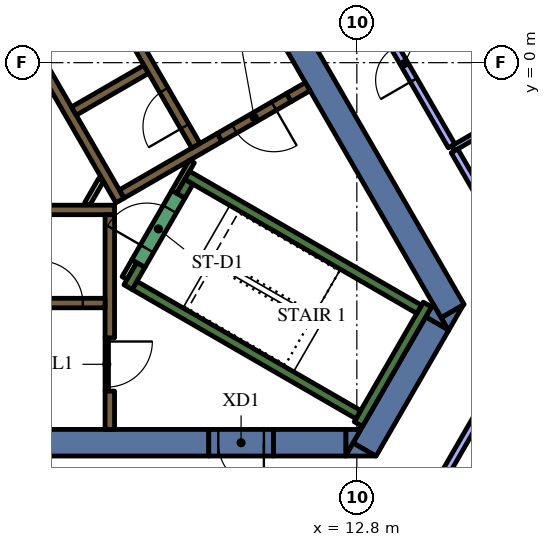
"""IFC4 building model, lengths in metres.
Left out: names, types, materials, properties, quantities, classifications, styles, units other than length and angle.
Written with IfcOpenShell. Run it as: python <this file> out.ifc"""

import sys

from ifc_helpers import new_model, si_unit, direction, frame, frame_2d, origin, place, context, subcontext, project, spatial, polyline, rectangle, outline, extrude, element, fill, save


model = new_model("IFC4")
c1 = context("Model", 3, precision=1e-05, world=origin(), true_north=direction((0.0, 1.0)))
c2 = subcontext(c1, "Body", "Model", "MODEL_VIEW")
j1 = project(units=[si_unit("LENGTHUNIT", "METRE"), si_unit("PLANEANGLEUNIT", "RADIAN")], contexts=[c1])
p1 = place(None, origin())
s1 = spatial("IfcSite", under=j1, at=p1, CompositionType="ELEMENT")
p2 = place(p1, origin())
s2 = spatial("IfcBuilding", under=s1, at=p2, CompositionType="ELEMENT")
p3 = place(p2, frame((0.0, 0.0, 231.0)))
s3 = spatial("IfcBuildingStorey", under=s2, at=p3, CompositionType="ELEMENT", Elevation=231.0)
p4 = place(p3, frame((9.085, 4.264, 0.0), z_axis=(0.0, 0.0, 1.0), x_axis=(0.499998082512, -0.866026510844, 0.0)))
e1 = element("IfcWall", 1, at=p4, inside=s3, PredefinedType="SOLIDWALL", context=c2, shape_type="SweptSolid", body=[
    extrude(rectangle(XDim=12.472, YDim=0.7, at=frame_2d((6.236, 0.0))), origin(), (0.0, 0.0, 1.0), 4.2),
])
p5 = place(p3, origin())
e2 = element("IfcWall", 2, at=p5, inside=s3, PredefinedType="SOLIDWALL", context=c2, shape_type="SweptSolid", body=[
    extrude(outline(polyline([(15.213, -7.05), (15.019, -6.714), (15.601, -6.378), (15.213, -7.05)])), origin(), (0.0, 0.0, 1.0), 4.2),
])
p6 = place(p3, frame((13.003, -10.179, 0.0), z_axis=(0.0, 0.0, 1.0), x_axis=(0.499972675833, 0.866041178825, 0.0)))
e3 = element("IfcWall", 3, at=p6, inside=s3, PredefinedType="SOLIDWALL", context=c2, shape_type="SweptSolid", body=[
    extrude(rectangle(XDim=3.829, YDim=0.7, at=frame_2d((1.915, 0.0))), origin(), (0.0, 0.0, 1.0), 4.2),
])
e4 = element("IfcWall", 4, at=p5, inside=s3, PredefinedType="SOLIDWALL", context=c2, shape_type="SweptSolid", body=[
    extrude(outline(polyline([(12.5, -10.35), (12.698, -10.005), (13.296, -10.35), (12.5, -10.35)])), origin(), (0.0, 0.0, 1.0), 4.2),
])
e5 = element("IfcWall", 5, at=p5, inside=s3, PredefinedType="SOLIDWALL", context=c2, shape_type="SweptSolid", body=[
    extrude(outline(polyline([(14.809, -6.35), (15.197, -7.022), (14.615, -6.686), (14.809, -6.35)])), origin(), (0.0, 0.0, 1.0), 4.2),
])
p7 = place(p3, frame((10.604, -10.0, 0.0), z_axis=(0.0, 0.0, 1.0), x_axis=(1.0, 0.0, 0.0)))
e6 = element("IfcWall", 6, at=p7, inside=s3, PredefinedType="SOLIDWALL", context=c2, shape_type="SweptSolid", body=[
    extrude(rectangle(XDim=1.909, YDim=0.7, at=frame_2d((0.955, 0.0))), origin(), (0.0, 0.0, 1.0), 4.2),
])
e7 = element("IfcWall", 7, at=p5, inside=s3, PredefinedType="SOLIDWALL", context=c2, shape_type="SweptSolid", body=[
    extrude(outline(polyline([(12.904, -9.65), (12.516, -10.322), (12.516, -9.65), (12.904, -9.65)])), origin(), (0.0, 0.0, 1.0), 4.2),
])
p8 = place(p3, frame((8.904, -10.0, 0.0), z_axis=(0.0, 0.0, 1.0), x_axis=(-1.0, 0.0, 0.0)))
e8 = element("IfcWall", 8, at=p8, inside=s3, PredefinedType="SOLIDWALL", context=c2, shape_type="SweptSolid", body=[
    extrude(rectangle(XDim=22.226, YDim=0.7, at=frame_2d((11.113, 0.0))), origin(), (0.0, 0.0, 1.0), 4.2),
])
p9 = place(p3, frame((12.84, -9.511, 0.0), z_axis=(0.0, 0.0, 1.0), x_axis=(0.500048121057, 0.865997619297, 0.0)))
e9 = element("IfcWall", 9, at=p9, inside=s3, PredefinedType="SOLIDWALL", context=c2, shape_type="SweptSolid", body=[
    extrude(rectangle(XDim=3.634, YDim=0.25, at=frame_2d((1.817, 0.0))), origin(), (0.0, 0.0, 1.0), 4.2),
])
p10 = place(p3, frame((12.84, -9.261, 0.0), z_axis=(0.0, 0.0, 1.0), x_axis=(-0.866013990052, 0.500019768644, 0.0)))
e10 = element("IfcWall", 10, at=p10, inside=s3, PredefinedType="SOLIDWALL", context=c2, shape_type="SweptSolid", body=[
    extrude(rectangle(XDim=6.8, YDim=0.25, at=frame_2d((3.4, 0.0))), origin(), (0.0, 0.0, 1.0), 4.2),
])
p11 = place(p3, frame((6.78, -5.906, 0.0), z_axis=(0.0, 0.0, 1.0), x_axis=(0.500223362819, 0.865896406789, 0.0)))
e11 = element("IfcWall", 11, at=p11, inside=s3, PredefinedType="SOLIDWALL", context=c2, shape_type="SweptSolid", body=[
    extrude(rectangle(XDim=0.675, YDim=0.25, at=frame_2d((0.337, 0.0))), origin(), (0.0, 0.0, 1.0), 4.2),
])
p12 = place(p3, frame((8.334, -2.964, 0.0), z_axis=(0.0, 0.0, 1.0), x_axis=(0.866016039709, -0.500016218704, 0.0)))
e12 = element("IfcWall", 12, at=p12, inside=s3, PredefinedType="SOLIDWALL", context=c2, shape_type="SweptSolid", body=[
    extrude(rectangle(XDim=7.05, YDim=0.25, at=frame_2d((3.525, 0.0))), origin(), (0.0, 0.0, 1.0), 4.2),
])
p13 = place(p3, frame((8.168, -3.503, 0.0), z_axis=(0.0, 0.0, 1.0), x_axis=(0.49972245349, 0.866185586049, 0.0)))
e13 = element("IfcWall", 13, at=p13, inside=s3, PredefinedType="SOLIDWALL", context=c2, shape_type="SweptSolid", body=[
    extrude(rectangle(XDim=0.425, YDim=0.25, at=frame_2d((0.212, 0.0))), origin(), (0.0, 0.0, 1.0), 4.2),
])
p14 = place(p3, frame((-5.545, -3.875, 0.0), z_axis=(0.0, 0.0, 1.0), x_axis=(1.0, 0.0, 0.0)))
e14 = element("IfcWall", 14, at=p14, inside=s3, PredefinedType="SOLIDWALL", context=c2, shape_type="SweptSolid", body=[
    extrude(rectangle(XDim=11.97, YDim=0.25, at=frame_2d((5.985, 0.0))), origin(), (0.0, 0.0, 1.0), 4.2),
])
p15 = place(p3, frame((6.3, -7.24, 0.0), z_axis=(0.0, 0.0, 1.0), x_axis=(0.0, 1.0, 0.0)))
e15 = element("IfcWall", 15, at=p15, inside=s3, PredefinedType="SOLIDWALL", context=c2, shape_type="SweptSolid", body=[
    extrude(rectangle(XDim=3.24, YDim=0.25, at=frame_2d((1.62, 0.0))), origin(), (0.0, 0.0, 1.0), 4.2),
])
p16 = place(p3, frame((6.3, -9.65, 0.0), z_axis=(0.0, 0.0, 1.0), x_axis=(0.0, 1.0, 0.0)))
e16 = element("IfcWall", 16, at=p16, inside=s3, PredefinedType="SOLIDWALL", context=c2, shape_type="SweptSolid", body=[
    extrude(rectangle(XDim=1.008, YDim=0.25, at=frame_2d((0.504, 0.0))), origin(), (0.0, 0.0, 1.0), 4.2),
])
p17 = place(p3, frame((11.507, -0.631, 0.0), z_axis=(0.0, 0.0, 1.0), x_axis=(-0.866093731455, -0.499881634324, 0.0)))
e17 = element("IfcWall", 17, at=p17, inside=s3, PredefinedType="SOLIDWALL", context=c2, shape_type="SweptSolid", body=[
    extrude(rectangle(XDim=0.575, YDim=0.25, at=frame_2d((0.288, 0.0))), origin(), (0.0, 0.0, 1.0), 4.2),
])
p18 = place(p3, frame((6.568, -3.627, 0.0), z_axis=(0.0, 0.0, 1.0), x_axis=(-0.499999455981, 0.866025717874, 0.0)))
e18 = element("IfcWall", 18, at=p18, inside=s3, PredefinedType="SOLIDWALL", context=c2, shape_type="SweptSolid", body=[
    extrude(rectangle(XDim=11.978, YDim=0.25, at=frame_2d((5.989, 0.0))), origin(), (0.0, 0.0, 1.0), 4.2),
])
p19 = place(p3, frame((5.354, -1.274, 0.0), z_axis=(0.0, 0.0, 1.0), x_axis=(0.866008176907, 0.50002983664, 0.0)))
e19 = element("IfcWall", 19, at=p19, inside=s3, PredefinedType="SOLIDWALL", context=c2, shape_type="SweptSolid", body=[
    extrude(rectangle(XDim=2.2, YDim=0.25, at=frame_2d((1.1, 0.0))), origin(), (0.0, 0.0, 1.0), 4.2),
])
p20 = place(p3, frame((6.614, -3.456, 0.0), z_axis=(0.0, 0.0, 1.0), x_axis=(0.866032512851, 0.499987686533, 0.0)))
e20 = element("IfcWall", 20, at=p20, inside=s3, PredefinedType="SOLIDWALL", context=c2, shape_type="SweptSolid", body=[
    extrude(rectangle(XDim=2.975, YDim=0.25, at=frame_2d((1.487, 0.0))), origin(), (0.0, 0.0, 1.0), 4.2),
])
p21 = place(p3, frame((6.945, -5.222, 0.0), z_axis=(0.0, 0.0, 1.0), x_axis=(-0.499818422106, -0.866130212453, 0.0)))
e21 = element("IfcWall", 21, at=p21, inside=s3, PredefinedType="PARTITIONING", context=c2, shape_type="SweptSolid", body=[
    extrude(rectangle(XDim=0.514, YDim=0.15, at=frame_2d((0.257, 0.0))), origin(), (0.0, 0.0, 1.0), 3.45),
])
p22 = place(p3, frame((8.459, -2.599, 0.0), z_axis=(0.0, 0.0, 1.0), x_axis=(-0.500041054325, -0.866001699761, 0.0)))
e22 = element("IfcWall", 22, at=p22, inside=s3, PredefinedType="PARTITIONING", context=c2, shape_type="SweptSolid", body=[
    extrude(rectangle(XDim=0.929, YDim=0.15, at=frame_2d((0.464, 0.0))), origin(), (0.0, 0.0, 1.0), 4.2),
])
p23 = place(p3, frame((5.705, -3.718, 0.0), z_axis=(0.0, 0.0, 1.0), x_axis=(0.499962090823, 0.866047289552, 0.0)))
e23 = element("IfcWall", 23, at=p23, inside=s3, PredefinedType="PARTITIONING", context=c2, shape_type="SweptSolid", body=[
    extrude(rectangle(XDim=0.735, YDim=0.15, at=frame_2d((0.367, 0.0))), origin(), (0.0, 0.0, 1.0), 3.45),
])
p24 = place(p3, frame((-6.175, -6.325, 0.0), z_axis=(0.0, 0.0, 1.0), x_axis=(1.0, 0.0, 0.0)))
e24 = element("IfcWall", 24, at=p24, inside=s3, PredefinedType="SOLIDWALL", context=c2, shape_type="SweptSolid", body=[
    extrude(rectangle(XDim=12.35, YDim=0.25, at=frame_2d((6.175, 0.0))), origin(), (0.0, 0.0, 1.0), 4.2),
])
p25 = place(p24, frame((0.585, 0.0, 0.0)))
e25 = element("IfcOpeningElement", 25, at=p25, cuts=e24, PredefinedType="OPENING", context=c2, shape_type="SweptSolid", body=[
    extrude(rectangle(XDim=1.1, YDim=2.1, at=frame_2d((0.55, 1.05))), frame((0.0, 0.135, 0.0), z_axis=(0.0, -1.0, 0.0), x_axis=(1.0, 0.0, 0.0)), (0.0, 0.0, 1.0), 0.27),
])
p26 = place(p24, frame((3.105, 0.0, 0.0)))
e26 = element("IfcOpeningElement", 26, at=p26, cuts=e24, PredefinedType="OPENING", context=c2, shape_type="SweptSolid", body=[
    extrude(rectangle(XDim=1.1, YDim=2.1, at=frame_2d((0.55, 1.05))), frame((0.0, 0.135, 0.0), z_axis=(0.0, -1.0, 0.0), x_axis=(1.0, 0.0, 0.0)), (0.0, 0.0, 1.0), 0.27),
])
p27 = place(p24, frame((5.625, 0.0, 0.0)))
e27 = element("IfcOpeningElement", 27, at=p27, cuts=e24, PredefinedType="OPENING", context=c2, shape_type="SweptSolid", body=[
    extrude(rectangle(XDim=1.1, YDim=2.1, at=frame_2d((0.55, 1.05))), frame((0.0, 0.135, 0.0), z_axis=(0.0, -1.0, 0.0), x_axis=(1.0, 0.0, 0.0)), (0.0, 0.0, 1.0), 0.27),
])
p28 = place(p24, frame((8.145, 0.0, 0.0)))
e28 = element("IfcOpeningElement", 28, at=p28, cuts=e24, PredefinedType="OPENING", context=c2, shape_type="SweptSolid", body=[
    extrude(rectangle(XDim=1.1, YDim=2.1, at=frame_2d((0.55, 1.05))), frame((0.0, 0.135, 0.0), z_axis=(0.0, -1.0, 0.0), x_axis=(1.0, 0.0, 0.0)), (0.0, 0.0, 1.0), 0.27),
])
p29 = place(p24, frame((10.665, 0.0, 0.0)))
e29 = element("IfcOpeningElement", 29, at=p29, cuts=e24, PredefinedType="OPENING", context=c2, shape_type="SweptSolid", body=[
    extrude(rectangle(XDim=1.1, YDim=2.1, at=frame_2d((0.55, 1.05))), frame((0.0, 0.135, 0.0), z_axis=(0.0, -1.0, 0.0), x_axis=(1.0, 0.0, 0.0)), (0.0, 0.0, 1.0), 0.27),
])
p30 = place(p3, frame((8.565, -2.185, 0.0), z_axis=(0.0, 0.0, 1.0), x_axis=(-0.499997954832, 0.866026584559, 0.0)))
e30 = element("IfcWall", 30, at=p30, inside=s3, PredefinedType="SOLIDWALL", context=c2, shape_type="SweptSolid", body=[
    extrude(rectangle(XDim=12.35, YDim=0.25, at=frame_2d((6.175, 0.0))), origin(), (0.0, 0.0, 1.0), 4.2),
])
p31 = place(p30, frame((0.585, 0.0, 0.0)))
e31 = element("IfcOpeningElement", 31, at=p31, cuts=e30, PredefinedType="OPENING", context=c2, shape_type="SweptSolid", body=[
    extrude(rectangle(XDim=1.1, YDim=2.1, at=frame_2d((0.55, 1.05))), frame((0.0, 0.135, 0.0), z_axis=(0.0, -1.0, 0.0), x_axis=(1.0, 0.0, 0.0)), (0.0, 0.0, 1.0), 0.27),
])
p32 = place(p3, frame((7.053, -5.284, 0.0), z_axis=(0.0, 0.0, 1.0), x_axis=(0.500078061341, 0.865980330357, 0.0)))
e32 = element("IfcWall", 32, at=p32, inside=s3, PredefinedType="SOLIDWALL", context=c2, shape_type="SweptSolid", body=[
    extrude(rectangle(XDim=2.1, YDim=0.4, at=frame_2d((1.05, 0.0))), origin(), (0.0, 0.0, 1.0), 4.2),
])
p33 = place(p32, frame((0.45, 0.0, 0.0)))
e33 = element("IfcOpeningElement", 33, at=p33, cuts=e32, PredefinedType="OPENING", context=c2, shape_type="SweptSolid", body=[
    extrude(rectangle(XDim=1.2, YDim=2.1, at=frame_2d((0.6, 1.05))), frame((0.0, 0.21, 0.0), z_axis=(0.0, -1.0, 0.0), x_axis=(1.0, 0.0, 0.0)), (0.0, 0.0, 1.0), 0.42),
])
p34 = place(p3, frame((6.22, -7.237, 0.0), z_axis=(0.0, 0.0, 1.0), x_axis=(0.0, -1.0, 0.0)))
e34 = element("IfcWall", 34, at=p34, inside=s3, PredefinedType="PARTITIONING", context=c2, shape_type="SweptSolid", body=[
    extrude(rectangle(XDim=1.4, YDim=0.09, at=frame_2d((0.7, 0.0))), origin(), (0.0, 0.0, 1.0), 3.45),
])
p35 = place(p34, frame((0.1, 0.0, 0.0)))
e35 = element("IfcOpeningElement", 35, at=p35, cuts=e34, PredefinedType="OPENING", context=c2, shape_type="SweptSolid", body=[
    extrude(rectangle(XDim=1.2, YDim=2.1, at=frame_2d((0.6, 1.05))), frame((0.0, 0.055, 0.0), z_axis=(0.0, -1.0, 0.0), x_axis=(1.0, 0.0, 0.0)), (0.0, 0.0, 1.0), 0.11),
])
p36 = place(p3, frame((11.009, -0.919, 0.0), z_axis=(0.0, 0.0, 1.0), x_axis=(-0.866059744384, -0.49994051562, 0.0)))
e36 = element("IfcWall", 36, at=p36, inside=s3, PredefinedType="SOLIDWALL", context=c2, shape_type="SweptSolid", body=[
    extrude(rectangle(XDim=2.1, YDim=0.25, at=frame_2d((1.05, 0.0))), origin(), (0.0, 0.0, 1.0), 4.2),
])
p37 = place(p36, frame((0.45, 0.0, 0.0)))
e37 = element("IfcOpeningElement", 37, at=p37, cuts=e36, PredefinedType="OPENING", context=c2, shape_type="SweptSolid", body=[
    extrude(rectangle(XDim=1.2, YDim=2.1, at=frame_2d((0.6, 1.05))), frame((0.0, 0.135, 0.0), z_axis=(0.0, -1.0, 0.0), x_axis=(1.0, 0.0, 0.0)), (0.0, 0.0, 1.0), 0.27),
])
p38 = place(p3, frame((10.604, -10.0, 0.0), z_axis=(0.0, 0.0, 1.0), x_axis=(-1.0, 0.0, 0.0)))
e38 = element("IfcWall", 38, at=p38, inside=s3, PredefinedType="SOLIDWALL", context=c2, shape_type="SweptSolid", body=[
    extrude(rectangle(XDim=1.7, YDim=0.7, at=frame_2d((0.85, 0.0))), origin(), (0.0, 0.0, 1.0), 4.2),
])
p39 = place(p38, frame((0.25, 0.0, 0.0)))
e39 = element("IfcOpeningElement", 39, at=p39, cuts=e38, PredefinedType="OPENING", context=c2, shape_type="SweptSolid", body=[
    extrude(rectangle(XDim=1.2, YDim=2.1, at=frame_2d((0.6, 1.05))), frame((0.0, 0.36, 0.0), z_axis=(0.0, -1.0, 0.0), x_axis=(1.0, 0.0, 0.0)), (0.0, 0.0, 1.0), 0.72),
])
p40 = place(p3, frame((14.362, -12.124, 0.0), z_axis=(0.0, 0.0, 1.0), x_axis=(0.500017005442, 0.866015585465, 0.0)))
e40 = element("IfcWall", 40, at=p40, inside=s3, PredefinedType="PARTITIONING", context=c2, shape_type="SweptSolid", body=[
    extrude(rectangle(XDim=6.338, YDim=0.2, at=frame_2d((3.169, 0.0))), origin(), (0.0, 0.0, 1.0), 3.45),
])
p41 = place(p3, frame((18.367, -0.504, 0.0), z_axis=(0.0, 0.0, 1.0), x_axis=(-0.866056812483, -0.499945594592, 0.0)))
e41 = element("IfcWall", 41, at=p41, inside=s3, PredefinedType="PARTITIONING", context=c2, shape_type="SweptSolid", body=[
    extrude(rectangle(XDim=3.504, YDim=0.15, at=frame_2d((1.752, 0.0))), origin(), (0.0, 0.0, 1.0), 3.45),
])
p42 = place(p41, frame((1.304, 0.0, 0.0)))
e42 = element("IfcOpeningElement", 42, at=p42, cuts=e41, PredefinedType="OPENING", context=c2, shape_type="SweptSolid", body=[
    extrude(rectangle(XDim=0.9, YDim=2.1, at=frame_2d((0.45, 1.05))), frame((0.0, 0.085, 0.0), z_axis=(0.0, -1.0, 0.0), x_axis=(1.0, 0.0, 0.0)), (0.0, 0.0, 1.0), 0.17),
])
p43 = place(p3, frame((17.696, -6.35, 0.0), z_axis=(0.0, 0.0, 1.0), x_axis=(-0.499976825411, 0.866038783226, 0.0)))
e43 = element("IfcWall", 43, at=p43, inside=s3, PredefinedType="PARTITIONING", context=c2, shape_type="SweptSolid", body=[
    extrude(rectangle(XDim=4.653, YDim=0.2, at=frame_2d((2.326, 0.0))), origin(), (0.0, 0.0, 1.0), 3.45),
])
p44 = place(p3, frame((15.295, -2.191, 0.0), z_axis=(0.0, 0.0, 1.0), x_axis=(-0.500039923732, 0.86600235258, 0.0)))
e44 = element("IfcWall", 44, at=p44, inside=s3, PredefinedType="PARTITIONING", context=c2, shape_type="SweptSolid", body=[
    extrude(rectangle(XDim=5.015, YDim=0.2, at=frame_2d((2.507, 0.0))), origin(), (0.0, 0.0, 1.0), 3.45),
])
p45 = place(p44, frame((2.0, 0.0, 0.0)))
e45 = element("IfcOpeningElement", 45, at=p45, cuts=e44, PredefinedType="OPENING", context=c2, shape_type="SweptSolid", body=[
    extrude(rectangle(XDim=1.0, YDim=2.1, at=frame_2d((0.5, 1.05))), frame((0.0, 0.11, 0.0), z_axis=(0.0, -1.0, 0.0), x_axis=(1.0, 0.0, 0.0)), (0.0, 0.0, 1.0), 0.22),
])
p46 = place(p29, origin())
e46 = element("IfcDoor", 46, at=p46, inside=s3, OperationType="DOUBLE_DOOR_SLIDING", PredefinedType="DOOR", context=c2, shape_type="SweptSolid", body=[
    extrude(rectangle(XDim=1.1, YDim=2.1, at=frame_2d((0.55, 1.05))), frame((0.0, 0.025, 0.0), z_axis=(0.0, -1.0, 0.0), x_axis=(1.0, 0.0, 0.0)), (0.0, 0.0, 1.0), 0.05),
])
fill(e29, e46)
p47 = place(p31, origin())
e47 = element("IfcDoor", 47, at=p47, inside=s3, OperationType="DOUBLE_DOOR_SLIDING", PredefinedType="DOOR", context=c2, shape_type="SweptSolid", body=[
    extrude(rectangle(XDim=1.1, YDim=2.1, at=frame_2d((0.55, 1.05))), frame((0.0, 0.025, 0.0), z_axis=(0.0, -1.0, 0.0), x_axis=(1.0, 0.0, 0.0)), (0.0, 0.0, 1.0), 0.05),
])
fill(e31, e47)
p48 = place(p33, origin())
e48 = element("IfcDoor", 48, at=p48, inside=s3, OperationType="SINGLE_SWING_LEFT", PredefinedType="DOOR", context=c2, shape_type="SweptSolid", body=[
    extrude(rectangle(XDim=1.2, YDim=2.1, at=frame_2d((0.6, 1.05))), frame((0.0, 0.025, 0.0), z_axis=(0.0, -1.0, 0.0), x_axis=(1.0, 0.0, 0.0)), (0.0, 0.0, 1.0), 0.05),
])
fill(e33, e48)
p49 = place(p35, origin())
e49 = element("IfcDoor", 49, at=p49, inside=s3, OperationType="SINGLE_SWING_LEFT", PredefinedType="DOOR", context=c2, shape_type="SweptSolid", body=[
    extrude(rectangle(XDim=1.2, YDim=2.1, at=frame_2d((0.6, 1.05))), frame((0.0, 0.025, 0.0), z_axis=(0.0, -1.0, 0.0), x_axis=(1.0, 0.0, 0.0)), (0.0, 0.0, 1.0), 0.05),
])
fill(e35, e49)
p50 = place(p37, origin())
e50 = element("IfcDoor", 50, at=p50, inside=s3, OperationType="SINGLE_SWING_LEFT", PredefinedType="DOOR", context=c2, shape_type="SweptSolid", body=[
    extrude(rectangle(XDim=1.2, YDim=2.1, at=frame_2d((0.6, 1.05))), frame((0.0, 0.025, 0.0), z_axis=(0.0, -1.0, 0.0), x_axis=(1.0, 0.0, 0.0)), (0.0, 0.0, 1.0), 0.05),
])
fill(e37, e50)
p51 = place(p39, origin())
e51 = element("IfcDoor", 51, at=p51, inside=s3, OperationType="SINGLE_SWING_LEFT", PredefinedType="DOOR", context=c2, shape_type="SweptSolid", body=[
    extrude(rectangle(XDim=1.2, YDim=2.1, at=frame_2d((0.6, 1.05))), frame((0.0, 0.025, 0.0), z_axis=(0.0, -1.0, 0.0), x_axis=(1.0, 0.0, 0.0)), (0.0, 0.0, 1.0), 0.05),
])
fill(e39, e51)
p52 = place(p45, origin())
e52 = element("IfcDoor", 52, at=p52, inside=s3, OperationType="SINGLE_SWING_LEFT", PredefinedType="DOOR", context=c2, shape_type="SweptSolid", body=[
    extrude(rectangle(XDim=1.0, YDim=2.1, at=frame_2d((0.5, 1.05))), frame((0.0, 0.025, 0.0), z_axis=(0.0, -1.0, 0.0), x_axis=(1.0, 0.0, 0.0)), (0.0, 0.0, 1.0), 0.05),
])
fill(e45, e52)
save(model, sys.argv[1])
